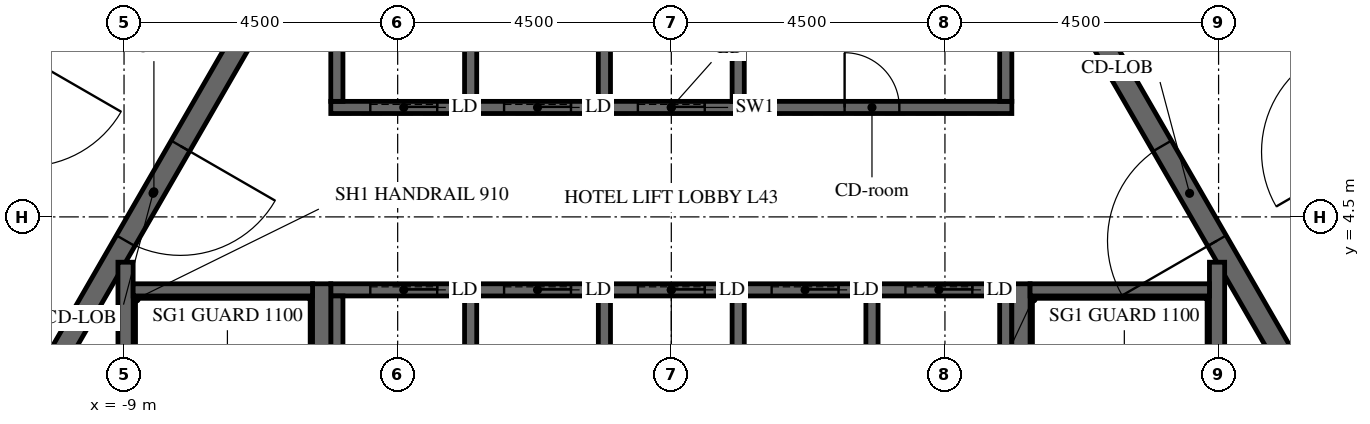
"""IFC4 building model, lengths in metres.
Left out: names, types, materials, properties, quantities, classifications, styles, units other than length and angle.
Written with IfcOpenShell. Run it as: python <this file> out.ifc"""

import sys

from ifc_helpers import new_model, si_unit, direction, frame, frame_2d, origin, place, context, subcontext, project, spatial, polyline, rectangle, outline, extrude, element, fill, save


model = new_model("IFC4")
c1 = context("Model", 3, precision=1e-05, world=origin(), true_north=direction((0.0, 1.0)))
c2 = subcontext(c1, "Body", "Model", "MODEL_VIEW")
j1 = project(units=[si_unit("LENGTHUNIT", "METRE"), si_unit("PLANEANGLEUNIT", "RADIAN")], contexts=[c1])
p1 = place(None, origin())
s1 = spatial("IfcSite", under=j1, at=p1, CompositionType="ELEMENT")
p2 = place(p1, origin())
s2 = spatial("IfcBuilding", under=s1, at=p2, CompositionType="ELEMENT")
p3 = place(p2, frame((0.0, 0.0, 183.9)))
s3 = spatial("IfcBuildingStorey", under=s2, at=p3, CompositionType="ELEMENT", Elevation=183.9)
p4 = place(p3, frame((-7.361, 12.75, -0.15), z_axis=(0.0, 0.0, 1.0), x_axis=(-0.50000571537, -0.866022103989, 0.0)))
e1 = element("IfcWall", 1, at=p4, inside=s3, PredefinedType="SHEAR", context=c2, shape_type="SweptSolid", body=[
    extrude(outline(polyline([(-0.144, -0.25), (14.867, -0.25), (14.578, 0.25), (0.144, 0.25), (-0.144, -0.25)])), origin(), (0.0, 0.0, 1.0), 3.9),
])
p5 = place(p4, frame((6.49, 0.0, 0.15)))
e2 = element("IfcOpeningElement", 2, at=p5, cuts=e1, PredefinedType="OPENING", context=c2, shape_type="SweptSolid", body=[
    extrude(rectangle(XDim=1.8, YDim=2.4, at=frame_2d((0.9, 1.2))), frame((0.0, 0.26, 0.0), z_axis=(0.0, -1.0, 0.0), x_axis=(1.0, 0.0, 0.0)), (0.0, 0.0, 1.0), 0.52),
])
p6 = place(p3, frame((14.722, 0.0, -0.15), z_axis=(0.0, 0.0, 1.0), x_axis=(-0.50000571537, 0.866022103989, 0.0)))
e3 = element("IfcWall", 3, at=p6, inside=s3, PredefinedType="SHEAR", context=c2, shape_type="SweptSolid", body=[
    extrude(outline(polyline([(-0.144, -0.25), (14.867, -0.25), (14.578, 0.25), (0.144, 0.25), (-0.144, -0.25)])), origin(), (0.0, 0.0, 1.0), 3.9),
])
p7 = place(p6, frame((6.432, 0.0, 0.15)))
e4 = element("IfcOpeningElement", 4, at=p7, cuts=e3, PredefinedType="OPENING", context=c2, shape_type="SweptSolid", body=[
    extrude(rectangle(XDim=1.8, YDim=2.4, at=frame_2d((0.9, 1.2))), frame((0.0, 0.26, 0.0), z_axis=(0.0, -1.0, 0.0), x_axis=(1.0, 0.0, 0.0)), (0.0, 0.0, 1.0), 0.52),
])
p8 = place(p3, frame((-5.673, 9.825, -0.15), z_axis=(0.0, 0.0, 1.0), x_axis=(-0.499995046907, -0.866028263435, 0.0)))
e5 = element("IfcWall", 5, at=p8, inside=s3, PredefinedType="SHEAR", context=c2, shape_type="SweptSolid", body=[
    extrude(outline(polyline([(-0.101, -0.175), (11.446, -0.175), (11.244, 0.175), (0.101, 0.175), (-0.101, -0.175)])), origin(), (0.0, 0.0, 1.0), 3.9),
])
p9 = place(p8, frame((4.801, 0.0, 0.15)))
e6 = element("IfcOpeningElement", 6, at=p9, cuts=e5, PredefinedType="OPENING", context=c2, shape_type="SweptSolid", body=[
    extrude(rectangle(XDim=1.8, YDim=2.4, at=frame_2d((0.9, 1.2))), frame((0.0, 0.185, 0.0), z_axis=(0.0, -1.0, 0.0), x_axis=(1.0, 0.0, 0.0)), (0.0, 0.0, 1.0), 0.37),
])
p10 = place(p3, frame((11.345, 0.0, -0.15), z_axis=(0.0, 0.0, 1.0), x_axis=(-0.499995046907, 0.866028263435, 0.0)))
e7 = element("IfcWall", 7, at=p10, inside=s3, PredefinedType="SHEAR", context=c2, shape_type="SweptSolid", body=[
    extrude(outline(polyline([(-0.101, -0.175), (11.446, -0.175), (11.244, 0.175), (0.101, 0.175), (-0.101, -0.175)])), origin(), (0.0, 0.0, 1.0), 3.9),
])
p11 = place(p10, frame((4.744, 0.0, 0.15)))
e8 = element("IfcOpeningElement", 8, at=p11, cuts=e7, PredefinedType="OPENING", context=c2, shape_type="SweptSolid", body=[
    extrude(rectangle(XDim=1.8, YDim=2.4, at=frame_2d((0.9, 1.2))), frame((0.0, 0.185, 0.0), z_axis=(0.0, -1.0, 0.0), x_axis=(1.0, 0.0, 0.0)), (0.0, 0.0, 1.0), 0.37),
])
p12 = place(p3, frame((-5.6, 6.3, -0.25), z_axis=(0.0, 0.0, 1.0), x_axis=(1.0, 0.0, 0.0)))
e9 = element("IfcWall", 9, at=p12, inside=s3, PredefinedType="SHEAR", context=c2, shape_type="SweptSolid", body=[
    extrude(rectangle(XDim=11.2, YDim=0.2, at=frame_2d((5.6, 0.0))), origin(), (0.0, 0.0, 1.0), 3.9),
])
p13 = place(p12, frame((8.45, 0.0, 0.25)))
e10 = element("IfcOpeningElement", 10, at=p13, cuts=e9, PredefinedType="OPENING", context=c2, shape_type="SweptSolid", body=[
    extrude(rectangle(XDim=0.9, YDim=2.1, at=frame_2d((0.45, 1.05))), frame((0.0, 0.11, 0.0), z_axis=(0.0, -1.0, 0.0), x_axis=(1.0, 0.0, 0.0)), (0.0, 0.0, 1.0), 0.22),
])
p14 = place(p12, frame((0.65, 0.0, 0.25)))
e11 = element("IfcOpeningElement", 11, at=p14, cuts=e9, PredefinedType="OPENING", context=c2, shape_type="SweptSolid", body=[
    extrude(rectangle(XDim=1.1, YDim=2.1, at=frame_2d((0.55, 1.05))), frame((0.0, 0.11, 0.0), z_axis=(0.0, -1.0, 0.0), x_axis=(1.0, 0.0, 0.0)), (0.0, 0.0, 1.0), 0.22),
])
p15 = place(p12, frame((2.85, 0.0, 0.25)))
e12 = element("IfcOpeningElement", 12, at=p15, cuts=e9, PredefinedType="OPENING", context=c2, shape_type="SweptSolid", body=[
    extrude(rectangle(XDim=1.1, YDim=2.1, at=frame_2d((0.55, 1.05))), frame((0.0, 0.11, 0.0), z_axis=(0.0, -1.0, 0.0), x_axis=(1.0, 0.0, 0.0)), (0.0, 0.0, 1.0), 0.22),
])
p16 = place(p12, frame((5.05, 0.0, 0.25)))
e13 = element("IfcOpeningElement", 13, at=p16, cuts=e9, PredefinedType="OPENING", context=c2, shape_type="SweptSolid", body=[
    extrude(rectangle(XDim=1.1, YDim=2.1, at=frame_2d((0.55, 1.05))), frame((0.0, 0.11, 0.0), z_axis=(0.0, -1.0, 0.0), x_axis=(1.0, 0.0, 0.0)), (0.0, 0.0, 1.0), 0.22),
])
for number, where, z_axis, x_axis in (
    (14, (-5.5, 6.4, -0.25), (0.0, 0.0, 1.0), (0.0, 1.0, 0.0)),
    (15, (-3.3, 6.4, -0.25), (0.0, 0.0, 1.0), (0.0, 1.0, 0.0)),
    (16, (-1.1, 6.4, -0.25), (0.0, 0.0, 1.0), (0.0, 1.0, 0.0)),
    (17, (1.1, 6.4, -0.25), (0.0, 0.0, 1.0), (0.0, 1.0, 0.0)),
    (18, (5.5, 6.4, -0.25), (0.0, 0.0, 1.0), (0.0, 1.0, 0.0)),
):
    element("IfcWall", number, at=place(p3, frame(where, z_axis=z_axis, x_axis=x_axis)), inside=s3, PredefinedType="SHEAR", context=c2, shape_type="SweptSolid", body=[
        extrude(rectangle(XDim=2.9, YDim=0.2, at=frame_2d((1.45, 0.0))), origin(), (0.0, 0.0, 1.0), 3.9),
    ])
p17 = place(p3, frame((-5.6, 3.3, -0.25), z_axis=(0.0, 0.0, 1.0), x_axis=(1.0, 0.0, 0.0)))
e19 = element("IfcWall", 19, at=p17, inside=s3, PredefinedType="SHEAR", context=c2, shape_type="SweptSolid", body=[
    extrude(rectangle(XDim=11.2, YDim=0.2, at=frame_2d((5.6, 0.0))), origin(), (0.0, 0.0, 1.0), 3.9),
])
p18 = place(p17, frame((0.65, 0.0, 0.25)))
e20 = element("IfcOpeningElement", 20, at=p18, cuts=e19, PredefinedType="OPENING", context=c2, shape_type="SweptSolid", body=[
    extrude(rectangle(XDim=1.1, YDim=2.1, at=frame_2d((0.55, 1.05))), frame((0.0, 0.11, 0.0), z_axis=(0.0, -1.0, 0.0), x_axis=(1.0, 0.0, 0.0)), (0.0, 0.0, 1.0), 0.22),
])
p19 = place(p17, frame((2.85, 0.0, 0.25)))
e21 = element("IfcOpeningElement", 21, at=p19, cuts=e19, PredefinedType="OPENING", context=c2, shape_type="SweptSolid", body=[
    extrude(rectangle(XDim=1.1, YDim=2.1, at=frame_2d((0.55, 1.05))), frame((0.0, 0.11, 0.0), z_axis=(0.0, -1.0, 0.0), x_axis=(1.0, 0.0, 0.0)), (0.0, 0.0, 1.0), 0.22),
])
p20 = place(p17, frame((5.05, 0.0, 0.25)))
e22 = element("IfcOpeningElement", 22, at=p20, cuts=e19, PredefinedType="OPENING", context=c2, shape_type="SweptSolid", body=[
    extrude(rectangle(XDim=1.1, YDim=2.1, at=frame_2d((0.55, 1.05))), frame((0.0, 0.11, 0.0), z_axis=(0.0, -1.0, 0.0), x_axis=(1.0, 0.0, 0.0)), (0.0, 0.0, 1.0), 0.22),
])
p21 = place(p17, frame((7.25, 0.0, 0.25)))
e23 = element("IfcOpeningElement", 23, at=p21, cuts=e19, PredefinedType="OPENING", context=c2, shape_type="SweptSolid", body=[
    extrude(rectangle(XDim=1.1, YDim=2.1, at=frame_2d((0.55, 1.05))), frame((0.0, 0.11, 0.0), z_axis=(0.0, -1.0, 0.0), x_axis=(1.0, 0.0, 0.0)), (0.0, 0.0, 1.0), 0.22),
])
p22 = place(p17, frame((9.45, 0.0, 0.25)))
e24 = element("IfcOpeningElement", 24, at=p22, cuts=e19, PredefinedType="OPENING", context=c2, shape_type="SweptSolid", body=[
    extrude(rectangle(XDim=1.1, YDim=2.1, at=frame_2d((0.55, 1.05))), frame((0.0, 0.11, 0.0), z_axis=(0.0, -1.0, 0.0), x_axis=(1.0, 0.0, 0.0)), (0.0, 0.0, 1.0), 0.22),
])
for number, where, z_axis, x_axis in (
    (25, (-5.5, 0.1, -0.25), (0.0, 0.0, 1.0), (0.0, 1.0, 0.0)),
    (26, (-3.3, 0.1, -0.25), (0.0, 0.0, 1.0), (0.0, 1.0, 0.0)),
    (27, (-1.1, 0.1, -0.25), (0.0, 0.0, 1.0), (0.0, 1.0, 0.0)),
    (28, (1.1, 0.1, -0.25), (0.0, 0.0, 1.0), (0.0, 1.0, 0.0)),
    (29, (3.3, 0.1, -0.25), (0.0, 0.0, 1.0), (0.0, 1.0, 0.0)),
    (30, (5.5, 0.1, -0.25), (0.0, 0.0, 1.0), (0.0, 1.0, 0.0)),
):
    element("IfcWall", number, at=place(p3, frame(where, z_axis=z_axis, x_axis=x_axis)), inside=s3, PredefinedType="SHEAR", context=c2, shape_type="SweptSolid", body=[
        extrude(rectangle(XDim=3.1, YDim=0.2, at=frame_2d((1.55, 0.0))), origin(), (0.0, 0.0, 1.0), 3.9),
    ])
p23 = place(p3, frame((5.75, -3.4, -0.25), z_axis=(0.0, 0.0, 1.0), x_axis=(0.0, 1.0, 0.0)))
e31 = element("IfcWall", 31, at=p23, inside=s3, PredefinedType="SHEAR", context=c2, shape_type="SweptSolid", body=[
    extrude(rectangle(XDim=6.8, YDim=0.3, at=frame_2d((3.4, 0.0))), origin(), (0.0, 0.0, 1.0), 3.9),
])
p24 = place(p3, frame((8.975, -3.755, -0.25), z_axis=(0.0, 0.0, 1.0), x_axis=(0.0, 1.0, 0.0)))
e32 = element("IfcWall", 32, at=p24, inside=s3, PredefinedType="SHEAR", context=c2, shape_type="SweptSolid", body=[
    extrude(rectangle(XDim=7.51, YDim=0.25, at=frame_2d((3.755, 0.0))), origin(), (0.0, 0.0, 1.0), 3.9),
])
p25 = place(p3, frame((5.9, 3.3, -0.25), z_axis=(0.0, 0.0, 1.0), x_axis=(1.0, 0.0, 0.0)))
e33 = element("IfcWall", 33, at=p25, inside=s3, PredefinedType="SHEAR", context=c2, shape_type="SweptSolid", body=[
    extrude(rectangle(XDim=2.95, YDim=0.2, at=frame_2d((1.475, 0.0))), origin(), (0.0, 0.0, 1.0), 3.9),
])
p26 = place(p3, frame((-5.75, -3.4, -0.25), z_axis=(0.0, 0.0, 1.0), x_axis=(0.0, 1.0, 0.0)))
e34 = element("IfcWall", 34, at=p26, inside=s3, PredefinedType="SHEAR", context=c2, shape_type="SweptSolid", body=[
    extrude(rectangle(XDim=6.8, YDim=0.3, at=frame_2d((3.4, 0.0))), origin(), (0.0, 0.0, 1.0), 3.9),
])
p27 = place(p3, frame((-8.975, -3.755, -0.25), z_axis=(0.0, 0.0, 1.0), x_axis=(0.0, 1.0, 0.0)))
e35 = element("IfcWall", 35, at=p27, inside=s3, PredefinedType="SHEAR", context=c2, shape_type="SweptSolid", body=[
    extrude(rectangle(XDim=7.51, YDim=0.25, at=frame_2d((3.755, 0.0))), origin(), (0.0, 0.0, 1.0), 3.9),
])
p28 = place(p3, frame((-8.85, 3.3, -0.25), z_axis=(0.0, 0.0, 1.0), x_axis=(1.0, 0.0, 0.0)))
e36 = element("IfcWall", 36, at=p28, inside=s3, PredefinedType="SHEAR", context=c2, shape_type="SweptSolid", body=[
    extrude(rectangle(XDim=2.95, YDim=0.2, at=frame_2d((1.475, 0.0))), origin(), (0.0, 0.0, 1.0), 3.9),
])
p29 = place(p3, frame((-8.704, 14.925, 0.0), z_axis=(0.0, 0.0, 1.0), x_axis=(-0.499998228944, -0.866026426302, 0.0)))
e37 = element("IfcWall", 37, at=p29, inside=s3, PredefinedType="PARTITIONING", context=c2, shape_type="SweptSolid", body=[
    extrude(rectangle(XDim=14.867, YDim=0.15, at=frame_2d((7.433, 0.0))), origin(), (0.0, 0.0, 1.0), 2.988),
])
p30 = place(p29, frame((4.901, 0.0, 0.0)))
e38 = element("IfcOpeningElement", 38, at=p30, cuts=e37, PredefinedType="OPENING", context=c2, shape_type="SweptSolid", body=[
    extrude(rectangle(XDim=1.0, YDim=2.1, at=frame_2d((0.5, 1.05))), frame((0.0, 0.085, 0.0), z_axis=(0.0, -1.0, 0.0), x_axis=(1.0, 0.0, 0.0)), (0.0, 0.0, 1.0), 0.17),
])
p31 = place(p29, frame((13.284, 0.0, 0.0)))
e39 = element("IfcOpeningElement", 39, at=p31, cuts=e37, PredefinedType="OPENING", context=c2, shape_type="SweptSolid", body=[
    extrude(rectangle(XDim=1.0, YDim=2.1, at=frame_2d((0.5, 1.05))), frame((0.0, 0.085, 0.0), z_axis=(0.0, -1.0, 0.0), x_axis=(1.0, 0.0, 0.0)), (0.0, 0.0, 1.0), 0.17),
])
p32 = place(p3, frame((17.277, 0.075, 0.0), z_axis=(0.0, 0.0, 1.0), x_axis=(-0.499998228944, 0.866026426302, 0.0)))
e40 = element("IfcWall", 40, at=p32, inside=s3, PredefinedType="PARTITIONING", context=c2, shape_type="SweptSolid", body=[
    extrude(rectangle(XDim=14.867, YDim=0.15, at=frame_2d((7.433, 0.0))), origin(), (0.0, 0.0, 1.0), 2.988),
])
p33 = place(p32, frame((9.398, 0.0, 0.0)))
e41 = element("IfcOpeningElement", 41, at=p33, cuts=e40, PredefinedType="OPENING", context=c2, shape_type="SweptSolid", body=[
    extrude(rectangle(XDim=1.0, YDim=2.1, at=frame_2d((0.5, 1.05))), frame((0.0, 0.085, 0.0), z_axis=(0.0, -1.0, 0.0), x_axis=(1.0, 0.0, 0.0)), (0.0, 0.0, 1.0), 0.17),
])
p34 = place(p9, origin())
e42 = element("IfcDoor", 42, at=p34, inside=s3, OperationType="DOUBLE_DOOR_SINGLE_SWING", PredefinedType="DOOR", context=c2, shape_type="SweptSolid", body=[
    extrude(rectangle(XDim=1.8, YDim=2.4, at=frame_2d((0.9, 1.2))), frame((0.0, 0.025, 0.0), z_axis=(0.0, -1.0, 0.0), x_axis=(1.0, 0.0, 0.0)), (0.0, 0.0, 1.0), 0.05),
])
fill(e6, e42)
p35 = place(p11, origin())
e43 = element("IfcDoor", 43, at=p35, inside=s3, OperationType="DOUBLE_DOOR_SINGLE_SWING", PredefinedType="DOOR", context=c2, shape_type="SweptSolid", body=[
    extrude(rectangle(XDim=1.8, YDim=2.4, at=frame_2d((0.9, 1.2))), frame((0.0, 0.025, 0.0), z_axis=(0.0, -1.0, 0.0), x_axis=(1.0, 0.0, 0.0)), (0.0, 0.0, 1.0), 0.05),
])
fill(e8, e43)
p36 = place(p13, origin())
e44 = element("IfcDoor", 44, at=p36, inside=s3, OperationType="SINGLE_SWING_LEFT", PredefinedType="DOOR", context=c2, shape_type="SweptSolid", body=[
    extrude(rectangle(XDim=0.9, YDim=2.1, at=frame_2d((0.45, 1.05))), frame((0.0, 0.025, 0.0), z_axis=(0.0, -1.0, 0.0), x_axis=(1.0, 0.0, 0.0)), (0.0, 0.0, 1.0), 0.05),
])
fill(e10, e44)
p37 = place(p14, origin())
e45 = element("IfcDoor", 45, at=p37, inside=s3, OperationType="SLIDING_TO_LEFT", PredefinedType="DOOR", context=c2, shape_type="SweptSolid", body=[
    extrude(rectangle(XDim=1.1, YDim=2.1, at=frame_2d((0.55, 1.05))), frame((0.0, 0.025, 0.0), z_axis=(0.0, -1.0, 0.0), x_axis=(1.0, 0.0, 0.0)), (0.0, 0.0, 1.0), 0.05),
])
fill(e11, e45)
p38 = place(p15, origin())
e46 = element("IfcDoor", 46, at=p38, inside=s3, OperationType="SLIDING_TO_LEFT", PredefinedType="DOOR", context=c2, shape_type="SweptSolid", body=[
    extrude(rectangle(XDim=1.1, YDim=2.1, at=frame_2d((0.55, 1.05))), frame((0.0, 0.025, 0.0), z_axis=(0.0, -1.0, 0.0), x_axis=(1.0, 0.0, 0.0)), (0.0, 0.0, 1.0), 0.05),
])
fill(e12, e46)
p39 = place(p16, origin())
e47 = element("IfcDoor", 47, at=p39, inside=s3, OperationType="SLIDING_TO_LEFT", PredefinedType="DOOR", context=c2, shape_type="SweptSolid", body=[
    extrude(rectangle(XDim=1.1, YDim=2.1, at=frame_2d((0.55, 1.05))), frame((0.0, 0.025, 0.0), z_axis=(0.0, -1.0, 0.0), x_axis=(1.0, 0.0, 0.0)), (0.0, 0.0, 1.0), 0.05),
])
fill(e13, e47)
p40 = place(p18, origin())
e48 = element("IfcDoor", 48, at=p40, inside=s3, OperationType="SLIDING_TO_LEFT", PredefinedType="DOOR", context=c2, shape_type="SweptSolid", body=[
    extrude(rectangle(XDim=1.1, YDim=2.1, at=frame_2d((0.55, 1.05))), frame((0.0, 0.025, 0.0), z_axis=(0.0, -1.0, 0.0), x_axis=(1.0, 0.0, 0.0)), (0.0, 0.0, 1.0), 0.05),
])
fill(e20, e48)
p41 = place(p19, origin())
e49 = element("IfcDoor", 49, at=p41, inside=s3, OperationType="SLIDING_TO_LEFT", PredefinedType="DOOR", context=c2, shape_type="SweptSolid", body=[
    extrude(rectangle(XDim=1.1, YDim=2.1, at=frame_2d((0.55, 1.05))), frame((0.0, 0.025, 0.0), z_axis=(0.0, -1.0, 0.0), x_axis=(1.0, 0.0, 0.0)), (0.0, 0.0, 1.0), 0.05),
])
fill(e21, e49)
p42 = place(p20, origin())
e50 = element("IfcDoor", 50, at=p42, inside=s3, OperationType="SLIDING_TO_LEFT", PredefinedType="DOOR", context=c2, shape_type="SweptSolid", body=[
    extrude(rectangle(XDim=1.1, YDim=2.1, at=frame_2d((0.55, 1.05))), frame((0.0, 0.025, 0.0), z_axis=(0.0, -1.0, 0.0), x_axis=(1.0, 0.0, 0.0)), (0.0, 0.0, 1.0), 0.05),
])
fill(e22, e50)
p43 = place(p21, origin())
e51 = element("IfcDoor", 51, at=p43, inside=s3, OperationType="SLIDING_TO_LEFT", PredefinedType="DOOR", context=c2, shape_type="SweptSolid", body=[
    extrude(rectangle(XDim=1.1, YDim=2.1, at=frame_2d((0.55, 1.05))), frame((0.0, 0.025, 0.0), z_axis=(0.0, -1.0, 0.0), x_axis=(1.0, 0.0, 0.0)), (0.0, 0.0, 1.0), 0.05),
])
fill(e23, e51)
p44 = place(p22, origin())
e52 = element("IfcDoor", 52, at=p44, inside=s3, OperationType="SLIDING_TO_LEFT", PredefinedType="DOOR", context=c2, shape_type="SweptSolid", body=[
    extrude(rectangle(XDim=1.1, YDim=2.1, at=frame_2d((0.55, 1.05))), frame((0.0, 0.025, 0.0), z_axis=(0.0, -1.0, 0.0), x_axis=(1.0, 0.0, 0.0)), (0.0, 0.0, 1.0), 0.05),
])
fill(e24, e52)
save(model, sys.argv[1])
